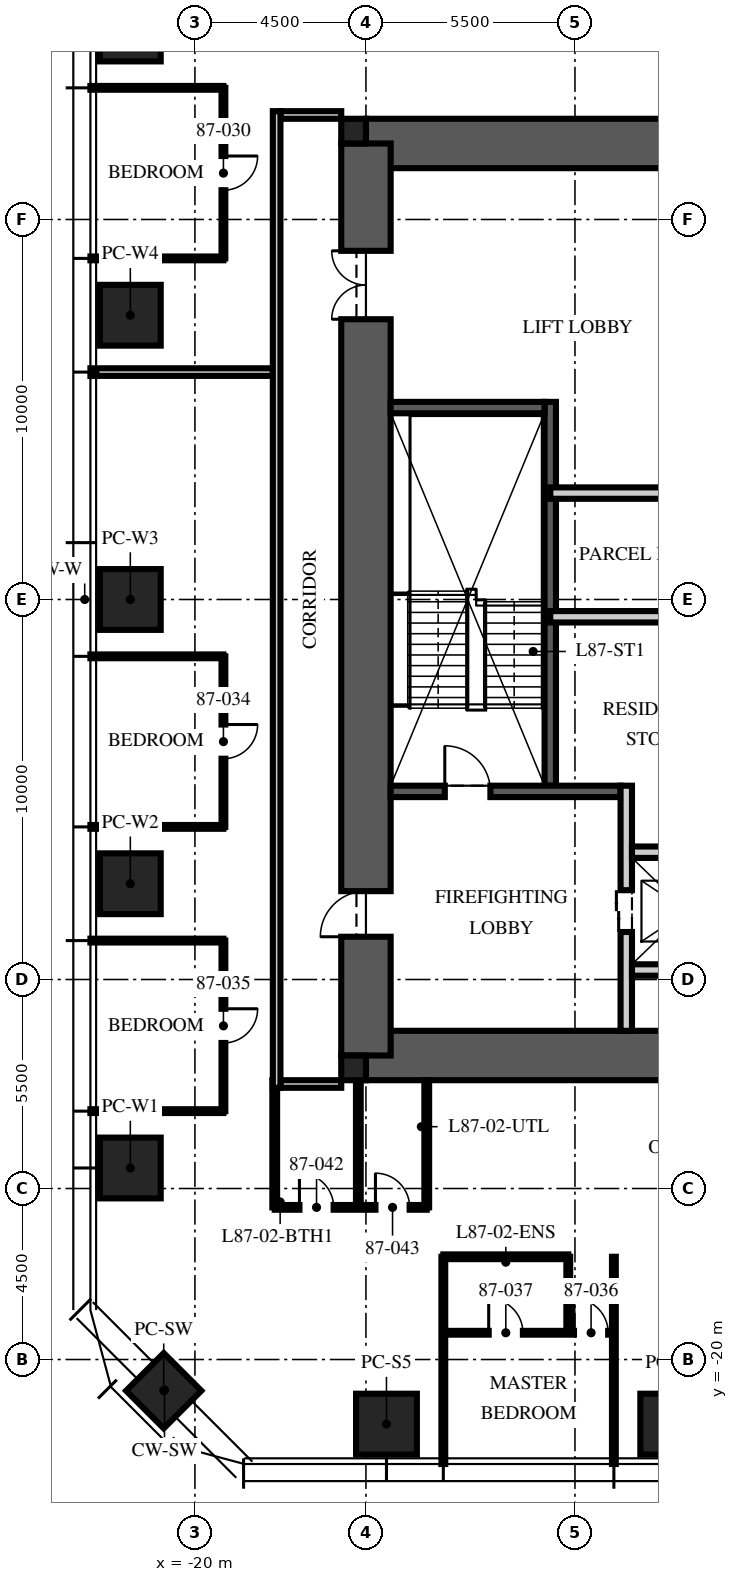
"""IFC4 building model, lengths in metres.
Left out: names, types, materials, properties, quantities, classifications, styles, units other than length and angle.
Written with IfcOpenShell. Run it as: python <this file> out.ifc"""

import sys

from ifc_helpers import new_model, si_unit, direction, frame, frame_2d, origin, origin_2d, place, context, subcontext, project, spatial, rectangle, extrude, element, fill, save


model = new_model("IFC4")
c1 = context("Model", 3, precision=1e-05, world=origin(), true_north=direction((0.0, 1.0)))
c2 = subcontext(c1, "Body", "Model", "MODEL_VIEW")
j1 = project(units=[si_unit("LENGTHUNIT", "METRE"), si_unit("PLANEANGLEUNIT", "RADIAN")], contexts=[c1])
p1 = place(None, origin())
s1 = spatial("IfcSite", under=j1, at=p1, CompositionType="ELEMENT")
p2 = place(p1, origin())
s2 = spatial("IfcBuilding", under=s1, at=p2, CompositionType="ELEMENT")
p3 = place(p2, frame((0.0, 0.0, 345.75)))
s3 = spatial("IfcBuildingStorey", under=s2, at=p3, CompositionType="ELEMENT", Elevation=345.75)
for number, where, z_axis, x_axis in (
    (1, (-15.5, 12.0, -0.25), (0.0, 0.0, 1.0), (1.0, 0.0, 0.0)),
    (2, (-15.5, -12.0, -0.25), (0.0, 0.0, 1.0), (1.0, 0.0, 0.0)),
):
    element("IfcWall", number, at=place(p3, frame(where, z_axis=z_axis, x_axis=x_axis)), inside=s3, PredefinedType="SHEAR", context=c2, shape_type="SweptSolid", body=[
        extrude(rectangle(XDim=31.0, YDim=1.3, at=frame_2d((15.5, 0.0))), origin(), (0.0, 0.0, 1.0), 3.75),
    ])
p4 = place(p3, frame((-15.5, -12.0, -0.25), z_axis=(0.0, 0.0, 1.0), x_axis=(0.0, 1.0, 0.0)))
e3 = element("IfcWall", 3, at=p4, inside=s3, PredefinedType="SHEAR", context=c2, shape_type="SweptSolid", body=[
    extrude(rectangle(XDim=24.0, YDim=1.3, at=frame_2d((12.0, 0.0))), origin(), (0.0, 0.0, 1.0), 3.75),
])
p5 = place(p4, frame((3.125, 0.0, 0.25)))
e4 = element("IfcOpeningElement", 4, at=p5, cuts=e3, PredefinedType="OPENING", context=c2, shape_type="SweptSolid", body=[
    extrude(rectangle(XDim=1.2, YDim=2.1, at=frame_2d((0.6, 1.05))), frame((0.0, 0.66, 0.0), z_axis=(0.0, -1.0, 0.0), x_axis=(1.0, 0.0, 0.0)), (0.0, 0.0, 1.0), 1.32),
])
p6 = place(p4, frame((19.375, 0.0, 0.25)))
e5 = element("IfcOpeningElement", 5, at=p6, cuts=e3, PredefinedType="OPENING", context=c2, shape_type="SweptSolid", body=[
    extrude(rectangle(XDim=1.8, YDim=2.1, at=frame_2d((0.9, 1.05))), frame((0.0, 0.66, 0.0), z_axis=(0.0, -1.0, 0.0), x_axis=(1.0, 0.0, 0.0)), (0.0, 0.0, 1.0), 1.32),
])
for number, where, z_axis, x_axis in (
    (6, (-15.825, 12.325, -0.25), (0.0, 0.0, 1.0), (1.0, 0.0, 0.0)),
    (7, (-15.825, -12.325, -0.25), (0.0, 0.0, 1.0), (1.0, 0.0, 0.0)),
):
    element("IfcColumn", number, at=place(p3, frame(where, z_axis=z_axis, x_axis=x_axis)), inside=s3, PredefinedType="COLUMN", context=c2, shape_type="SweptSolid", body=[
        extrude(rectangle(XDim=0.65, YDim=0.65, at=origin_2d()), origin(), (0.0, 0.0, 1.0), 3.75),
    ])
for number, where, z_axis, x_axis in (
    (8, (-7.48, -21.7, 0.0), (0.0, 0.0, 1.0), (1.0, 0.0, 0.0)),
    (9, (-14.96, -21.7, 0.0), (0.0, 0.0, 1.0), (1.0, 0.0, 0.0)),
    (10, (-21.7, -14.96, 0.0), (0.0, 0.0, 1.0), (0.0, 1.0, 0.0)),
    (11, (-21.7, -7.48, 0.0), (0.0, 0.0, 1.0), (0.0, 1.0, 0.0)),
    (12, (-21.7, 0.0, 0.0), (0.0, 0.0, 1.0), (0.0, 1.0, 0.0)),
    (13, (-21.7, 7.48, 0.0), (0.0, 0.0, 1.0), (0.0, 1.0, 0.0)),
    (14, (-21.7, 14.96, 0.0), (0.0, 0.0, 1.0), (0.0, 1.0, 0.0)),
):
    element("IfcColumn", number, at=place(p3, frame(where, z_axis=z_axis, x_axis=x_axis)), inside=s3, PredefinedType="COLUMN", context=c2, shape_type="SweptSolid", body=[
        extrude(rectangle(XDim=1.6, YDim=1.6, at=origin_2d()), origin(), (0.0, 0.0, 1.0), 3.75),
    ])
p7 = place(p3, frame((-20.821, -20.821, 0.0), z_axis=(0.0, 0.0, 1.0), x_axis=(0.707106781187, -0.707106781187, 0.0)))
e15 = element("IfcColumn", 15, at=p7, inside=s3, PredefinedType="COLUMN", context=c2, shape_type="SweptSolid", body=[
    extrude(rectangle(XDim=1.4, YDim=1.4, at=origin_2d()), origin(), (0.0, 0.0, 1.0), 3.75),
])
p8 = place(p3, frame((-10.65, -4.9, 0.0), z_axis=(0.0, 0.0, 1.0), x_axis=(0.0, 1.0, 0.0)))
e16 = element("IfcWall", 16, at=p8, inside=s3, PredefinedType="SOLIDWALL", context=c2, shape_type="SweptSolid", body=[
    extrude(rectangle(XDim=10.1, YDim=0.3, at=frame_2d((5.05, 0.0))), origin(), (0.0, 0.0, 1.0), 3.5),
])
p9 = place(p3, frame((-14.85, -5.05, 0.0), z_axis=(0.0, 0.0, 1.0), x_axis=(1.0, 0.0, 0.0)))
e17 = element("IfcWall", 17, at=p9, inside=s3, PredefinedType="SOLIDWALL", context=c2, shape_type="SweptSolid", body=[
    extrude(rectangle(XDim=6.05, YDim=0.3, at=frame_2d((3.025, 0.0))), origin(), (0.0, 0.0, 1.0), 3.5),
])
p10 = place(p9, frame((1.425, 0.0, 0.0)))
e18 = element("IfcOpeningElement", 18, at=p10, cuts=e17, PredefinedType="OPENING", context=c2, shape_type="SweptSolid", body=[
    extrude(rectangle(XDim=1.2, YDim=2.1, at=frame_2d((0.6, 1.05))), frame((0.0, 0.16, 0.0), z_axis=(0.0, -1.0, 0.0), x_axis=(1.0, 0.0, 0.0)), (0.0, 0.0, 1.0), 0.32),
])
p11 = place(p3, frame((-14.85, 5.05, 0.0), z_axis=(0.0, 0.0, 1.0), x_axis=(1.0, 0.0, 0.0)))
e19 = element("IfcWall", 19, at=p11, inside=s3, PredefinedType="SOLIDWALL", context=c2, shape_type="SweptSolid", body=[
    extrude(rectangle(XDim=4.05, YDim=0.3, at=frame_2d((2.025, 0.0))), origin(), (0.0, 0.0, 1.0), 3.5),
])
p12 = place(p3, frame((-8.65, -11.35, 0.0), z_axis=(0.0, 0.0, 1.0), x_axis=(0.0, 1.0, 0.0)))
e20 = element("IfcWall", 20, at=p12, inside=s3, PredefinedType="PARTITIONING", context=c2, shape_type="SweptSolid", body=[
    extrude(rectangle(XDim=6.45, YDim=0.3, at=frame_2d((3.225, 0.0))), origin(), (0.0, 0.0, 1.0), 3.5),
])
p13 = place(p12, frame((2.6, 0.0, 0.0)))
e21 = element("IfcOpeningElement", 21, at=p13, cuts=e20, PredefinedType="OPENING", context=c2, shape_type="SweptSolid", body=[
    extrude(rectangle(XDim=1.1, YDim=2.1, at=frame_2d((0.55, 1.05))), frame((0.0, 0.16, 0.0), z_axis=(0.0, -1.0, 0.0), x_axis=(1.0, 0.0, 0.0)), (0.0, 0.0, 1.0), 0.32),
])
p14 = place(p3, frame((-8.5, -6.65, 0.0), z_axis=(0.0, 0.0, 1.0), x_axis=(1.0, 0.0, 0.0)))
e22 = element("IfcWall", 22, at=p14, inside=s3, PredefinedType="PARTITIONING", context=c2, shape_type="SweptSolid", body=[
    extrude(rectangle(XDim=17.0, YDim=0.3, at=frame_2d((8.5, 0.0))), origin(), (0.0, 0.0, 1.0), 3.5),
])
p15 = place(p14, frame((7.8, 0.0, 0.0)))
e23 = element("IfcOpeningElement", 23, at=p15, cuts=e22, PredefinedType="OPENING", context=c2, shape_type="SweptSolid", body=[
    extrude(rectangle(XDim=1.3, YDim=2.4, at=frame_2d((0.65, 1.2))), frame((0.0, 0.16, 0.0), z_axis=(0.0, -1.0, 0.0), x_axis=(1.0, 0.0, 0.0)), (0.0, 0.0, 1.0), 0.32),
])
p16 = place(p14, frame((5.65, 0.0, 0.0)))
e24 = element("IfcOpeningElement", 24, at=p16, cuts=e22, PredefinedType="OPENING", context=c2, shape_type="SweptSolid", body=[
    extrude(rectangle(XDim=0.9, YDim=2.1, at=frame_2d((0.45, 1.05))), frame((0.0, 0.16, 0.0), z_axis=(0.0, -1.0, 0.0), x_axis=(1.0, 0.0, 0.0)), (0.0, 0.0, 1.0), 0.32),
])
p17 = place(p14, frame((10.4, 0.0, 0.0)))
e25 = element("IfcOpeningElement", 25, at=p17, cuts=e22, PredefinedType="OPENING", context=c2, shape_type="SweptSolid", body=[
    extrude(rectangle(XDim=0.9, YDim=2.1, at=frame_2d((0.45, 1.05))), frame((0.0, 0.16, 0.0), z_axis=(0.0, -1.0, 0.0), x_axis=(1.0, 0.0, 0.0)), (0.0, 0.0, 1.0), 0.32),
])
p18 = place(p3, frame((-8.5, -9.75, 0.0), z_axis=(0.0, 0.0, 1.0), x_axis=(1.0, 0.0, 0.0)))
e26 = element("IfcWall", 26, at=p18, inside=s3, PredefinedType="PARTITIONING", context=c2, shape_type="SweptSolid", body=[
    extrude(rectangle(XDim=2.9, YDim=0.3, at=frame_2d((1.45, 0.0))), origin(), (0.0, 0.0, 1.0), 3.5),
])
p19 = place(p3, frame((-10.65, 2.8, 0.0), z_axis=(0.0, 0.0, 1.0), x_axis=(1.0, 0.0, 0.0)))
e27 = element("IfcWall", 27, at=p19, inside=s3, PredefinedType="PARTITIONING", context=c2, shape_type="SweptSolid", body=[
    extrude(rectangle(XDim=21.3, YDim=0.3, at=frame_2d((10.65, 0.0))), origin(), (0.0, 0.0, 1.0), 3.5),
])
p20 = place(p19, frame((10.05, 0.0, 0.0)))
e28 = element("IfcOpeningElement", 28, at=p20, cuts=e27, PredefinedType="OPENING", context=c2, shape_type="SweptSolid", body=[
    extrude(rectangle(XDim=1.2, YDim=2.1, at=frame_2d((0.6, 1.05))), frame((0.0, 0.16, 0.0), z_axis=(0.0, -1.0, 0.0), x_axis=(1.0, 0.0, 0.0)), (0.0, 0.0, 1.0), 0.32),
])
p21 = place(p19, frame((19.121, 0.0, 0.0)))
e29 = element("IfcOpeningElement", 29, at=p21, cuts=e27, PredefinedType="OPENING", context=c2, shape_type="SweptSolid", body=[
    extrude(rectangle(XDim=0.9, YDim=2.1, at=frame_2d((0.45, 1.05))), frame((0.0, 0.16, 0.0), z_axis=(0.0, -1.0, 0.0), x_axis=(1.0, 0.0, 0.0)), (0.0, 0.0, 1.0), 0.32),
])
p22 = place(p3, frame((-10.65, -0.455, 0.0), z_axis=(0.0, 0.0, 1.0), x_axis=(1.0, 0.0, 0.0)))
e30 = element("IfcWall", 30, at=p22, inside=s3, PredefinedType="PARTITIONING", context=c2, shape_type="SweptSolid", body=[
    extrude(rectangle(XDim=5.55, YDim=0.3, at=frame_2d((2.775, 0.0))), origin(), (0.0, 0.0, 1.0), 3.5),
])
for number, where, z_axis, x_axis in (
    (31, (-16.15, 12.75, 0.0), (0.0, 0.0, 1.0), (-1.0, 0.0, 0.0)),
    (32, (-16.15, -12.75, 0.0), (0.0, 0.0, 1.0), (-1.0, 0.0, 0.0)),
):
    element("IfcWall", number, at=place(p3, frame(where, z_axis=z_axis, x_axis=x_axis)), inside=s3, PredefinedType="PARTITIONING", context=c2, shape_type="SweptSolid", body=[
        extrude(rectangle(XDim=1.6, YDim=0.2, at=frame_2d((0.8, 0.0))), origin(), (0.0, 0.0, 1.0), 2.5),
    ])
for number, where, z_axis, x_axis in (
    (33, (-19.25, 13.464, 0.0), (0.0, 0.0, 1.0), (-1.0, 0.0, 0.0)),
    (34, (-19.25, 8.976, 0.0), (0.0, 0.0, 1.0), (-1.0, 0.0, 0.0)),
):
    element("IfcWall", number, at=place(p3, frame(where, z_axis=z_axis, x_axis=x_axis)), inside=s3, PredefinedType="PARTITIONING", context=c2, shape_type="SweptSolid", body=[
        extrude(rectangle(XDim=3.5, YDim=0.1, at=frame_2d((1.75, 0.0))), origin(), (0.0, 0.0, 1.0), 2.91),
    ])
p23 = place(p3, frame((-17.95, 5.984, 0.0), z_axis=(0.0, 0.0, 1.0), x_axis=(-1.0, 0.0, 0.0)))
e35 = element("IfcWall", 35, at=p23, inside=s3, PredefinedType="PARTITIONING", context=c2, shape_type="SweptSolid", body=[
    extrude(rectangle(XDim=4.8, YDim=0.2, at=frame_2d((2.4, 0.0))), origin(), (0.0, 0.0, 1.0), 2.91),
])
for number, where, z_axis, x_axis in (
    (36, (-19.25, -1.496, 0.0), (0.0, 0.0, 1.0), (-1.0, 0.0, 0.0)),
    (37, (-19.25, -5.984, 0.0), (0.0, 0.0, 1.0), (-1.0, 0.0, 0.0)),
    (38, (-19.25, -8.976, 0.0), (0.0, 0.0, 1.0), (-1.0, 0.0, 0.0)),
    (39, (-19.25, -13.464, 0.0), (0.0, 0.0, 1.0), (-1.0, 0.0, 0.0)),
):
    element("IfcWall", number, at=place(p3, frame(where, z_axis=z_axis, x_axis=x_axis)), inside=s3, PredefinedType="PARTITIONING", context=c2, shape_type="SweptSolid", body=[
        extrude(rectangle(XDim=3.5, YDim=0.1, at=frame_2d((1.75, 0.0))), origin(), (0.0, 0.0, 1.0), 2.91),
    ])
for number, where, z_axis, x_axis in (
    (40, (-13.464, -17.296, 0.0), (0.0, 0.0, 1.0), (0.0, -1.0, 0.0)),
    (41, (-8.976, -17.296, 0.0), (0.0, 0.0, 1.0), (0.0, -1.0, 0.0)),
):
    element("IfcWall", number, at=place(p3, frame(where, z_axis=z_axis, x_axis=x_axis)), inside=s3, PredefinedType="PARTITIONING", context=c2, shape_type="SweptSolid", body=[
        extrude(rectangle(XDim=5.454, YDim=0.1, at=frame_2d((2.727, 0.0))), origin(), (0.0, 0.0, 1.0), 2.91),
    ])
p24 = place(p3, frame((-19.25, 13.464, 0.0), z_axis=(0.0, 0.0, 1.0), x_axis=(0.0, -1.0, 0.0)))
e42 = element("IfcWall", 42, at=p24, inside=s3, PredefinedType="PARTITIONING", context=c2, shape_type="SweptSolid", body=[
    extrude(rectangle(XDim=4.488, YDim=0.1, at=frame_2d((2.244, 0.0))), origin(), (0.0, 0.0, 1.0), 2.81),
])
p25 = place(p24, frame((1.794, 0.0, 0.0)))
e43 = element("IfcOpeningElement", 43, at=p25, cuts=e42, PredefinedType="OPENING", context=c2, shape_type="SweptSolid", body=[
    extrude(rectangle(XDim=0.9, YDim=2.1, at=frame_2d((0.45, 1.05))), frame((0.0, 0.06, 0.0), z_axis=(0.0, -1.0, 0.0), x_axis=(1.0, 0.0, 0.0)), (0.0, 0.0, 1.0), 0.12),
])
p26 = place(p3, frame((-19.25, -1.496, 0.0), z_axis=(0.0, 0.0, 1.0), x_axis=(0.0, -1.0, 0.0)))
e44 = element("IfcWall", 44, at=p26, inside=s3, PredefinedType="PARTITIONING", context=c2, shape_type="SweptSolid", body=[
    extrude(rectangle(XDim=4.488, YDim=0.1, at=frame_2d((2.244, 0.0))), origin(), (0.0, 0.0, 1.0), 2.81),
])
p27 = place(p26, frame((1.794, 0.0, 0.0)))
e45 = element("IfcOpeningElement", 45, at=p27, cuts=e44, PredefinedType="OPENING", context=c2, shape_type="SweptSolid", body=[
    extrude(rectangle(XDim=0.9, YDim=2.1, at=frame_2d((0.45, 1.05))), frame((0.0, 0.06, 0.0), z_axis=(0.0, -1.0, 0.0), x_axis=(1.0, 0.0, 0.0)), (0.0, 0.0, 1.0), 0.12),
])
p28 = place(p3, frame((-19.25, -8.976, 0.0), z_axis=(0.0, 0.0, 1.0), x_axis=(0.0, -1.0, 0.0)))
e46 = element("IfcWall", 46, at=p28, inside=s3, PredefinedType="PARTITIONING", context=c2, shape_type="SweptSolid", body=[
    extrude(rectangle(XDim=4.488, YDim=0.1, at=frame_2d((2.244, 0.0))), origin(), (0.0, 0.0, 1.0), 2.81),
])
p29 = place(p28, frame((1.794, 0.0, 0.0)))
e47 = element("IfcOpeningElement", 47, at=p29, cuts=e46, PredefinedType="OPENING", context=c2, shape_type="SweptSolid", body=[
    extrude(rectangle(XDim=0.9, YDim=2.1, at=frame_2d((0.45, 1.05))), frame((0.0, 0.06, 0.0), z_axis=(0.0, -1.0, 0.0), x_axis=(1.0, 0.0, 0.0)), (0.0, 0.0, 1.0), 0.12),
])
p30 = place(p3, frame((-13.464, -19.296, 0.0), z_axis=(0.0, 0.0, 1.0), x_axis=(1.0, 0.0, 0.0)))
e48 = element("IfcWall", 48, at=p30, inside=s3, PredefinedType="PARTITIONING", context=c2, shape_type="SweptSolid", body=[
    extrude(rectangle(XDim=4.488, YDim=0.1, at=frame_2d((2.244, 0.0))), origin(), (0.0, 0.0, 1.0), 2.81),
])
p31 = place(p30, frame((3.438, 0.0, 0.0)))
e49 = element("IfcOpeningElement", 49, at=p31, cuts=e48, PredefinedType="OPENING", context=c2, shape_type="SweptSolid", body=[
    extrude(rectangle(XDim=0.9, YDim=2.1, at=frame_2d((0.45, 1.05))), frame((0.0, 0.06, 0.0), z_axis=(0.0, -1.0, 0.0), x_axis=(1.0, 0.0, 0.0)), (0.0, 0.0, 1.0), 0.12),
])
p32 = place(p30, frame((1.194, 0.0, 0.0)))
e50 = element("IfcOpeningElement", 50, at=p32, cuts=e48, PredefinedType="OPENING", context=c2, shape_type="SweptSolid", body=[
    extrude(rectangle(XDim=0.9, YDim=2.1, at=frame_2d((0.45, 1.05))), frame((0.0, 0.06, 0.0), z_axis=(0.0, -1.0, 0.0), x_axis=(1.0, 0.0, 0.0)), (0.0, 0.0, 1.0), 0.12),
])
p33 = place(p3, frame((-10.176, -17.296, 0.0), z_axis=(0.0, 0.0, 1.0), x_axis=(0.0, -1.0, 0.0)))
e51 = element("IfcWall", 51, at=p33, inside=s3, PredefinedType="PARTITIONING", context=c2, shape_type="SweptSolid", body=[
    extrude(rectangle(XDim=2.0, YDim=0.1, at=frame_2d((1.0, 0.0))), origin(), (0.0, 0.0, 1.0), 3.5),
])
p34 = place(p3, frame((-13.464, -17.296, 0.0), z_axis=(0.0, 0.0, 1.0), x_axis=(1.0, 0.0, 0.0)))
e52 = element("IfcWall", 52, at=p34, inside=s3, PredefinedType="PARTITIONING", context=c2, shape_type="SweptSolid", body=[
    extrude(rectangle(XDim=3.288, YDim=0.125, at=frame_2d((1.644, 0.0))), origin(), (0.0, 0.0, 1.0), 2.81),
])
p35 = place(p3, frame((-17.9, -15.996, 0.0), z_axis=(0.0, 0.0, 1.0), x_axis=(1.0, 0.0, 0.0)))
e53 = element("IfcWall", 53, at=p35, inside=s3, PredefinedType="PARTITIONING", context=c2, shape_type="SweptSolid", body=[
    extrude(rectangle(XDim=4.0, YDim=0.125, at=frame_2d((2.0, 0.0))), origin(), (0.0, 0.0, 1.0), 2.5),
])
p36 = place(p35, frame((0.65, 0.0, 0.0)))
e54 = element("IfcOpeningElement", 54, at=p36, cuts=e53, PredefinedType="OPENING", context=c2, shape_type="SweptSolid", body=[
    extrude(rectangle(XDim=0.9, YDim=2.1, at=frame_2d((0.45, 1.05))), frame((0.0, 0.073, 0.0), z_axis=(0.0, -1.0, 0.0), x_axis=(1.0, 0.0, 0.0)), (0.0, 0.0, 1.0), 0.145),
])
p37 = place(p35, frame((2.65, 0.0, 0.0)))
e55 = element("IfcOpeningElement", 55, at=p37, cuts=e53, PredefinedType="OPENING", context=c2, shape_type="SweptSolid", body=[
    extrude(rectangle(XDim=0.9, YDim=2.1, at=frame_2d((0.45, 1.05))), frame((0.0, 0.073, 0.0), z_axis=(0.0, -1.0, 0.0), x_axis=(1.0, 0.0, 0.0)), (0.0, 0.0, 1.0), 0.145),
])
for number, where, z_axis, x_axis in (
    (56, (-17.9, -12.65, 0.0), (0.0, 0.0, 1.0), (0.0, -1.0, 0.0)),
    (57, (-15.7, -12.65, 0.0), (0.0, 0.0, 1.0), (0.0, -1.0, 0.0)),
):
    element("IfcWall", number, at=place(p3, frame(where, z_axis=z_axis, x_axis=x_axis)), inside=s3, PredefinedType="PARTITIONING", context=c2, shape_type="SweptSolid", body=[
        extrude(rectangle(XDim=3.346, YDim=0.125, at=frame_2d((1.673, 0.0))), origin(), (0.0, 0.0, 1.0), 2.5),
    ])
p38 = place(p3, frame((-13.9, -12.65, 0.0), z_axis=(0.0, 0.0, 1.0), x_axis=(0.0, -1.0, 0.0)))
e58 = element("IfcWall", 58, at=p38, inside=s3, PredefinedType="PARTITIONING", context=c2, shape_type="SweptSolid", body=[
    extrude(rectangle(XDim=3.346, YDim=0.125, at=frame_2d((1.673, 0.0))), origin(), (0.0, 0.0, 1.0), 3.5),
])
p39 = place(p3, frame((-17.85, 12.85, 0.0), z_axis=(0.0, 0.0, 1.0), x_axis=(0.0, -1.0, 0.0)))
e59 = element("IfcWall", 59, at=p39, inside=s3, PredefinedType="PARTITIONING", context=c2, shape_type="SweptSolid", body=[
    extrude(rectangle(XDim=25.7, YDim=0.2, at=frame_2d((12.85, 0.0))), origin(), (0.0, 0.0, 1.0), 2.81),
])
p40 = place(p10, origin())
e60 = element("IfcDoor", 60, at=p40, inside=s3, OperationType="SINGLE_SWING_LEFT", PredefinedType="DOOR", context=c2, shape_type="SweptSolid", body=[
    extrude(rectangle(XDim=1.2, YDim=2.1, at=frame_2d((0.6, 1.05))), frame((0.0, 0.025, 0.0), z_axis=(0.0, -1.0, 0.0), x_axis=(1.0, 0.0, 0.0)), (0.0, 0.0, 1.0), 0.05),
])
fill(e18, e60)
p41 = place(p5, origin())
e61 = element("IfcDoor", 61, at=p41, inside=s3, OperationType="SINGLE_SWING_LEFT", PredefinedType="DOOR", context=c2, shape_type="SweptSolid", body=[
    extrude(rectangle(XDim=1.2, YDim=2.1, at=frame_2d((0.6, 1.05))), frame((0.0, 0.025, 0.0), z_axis=(0.0, -1.0, 0.0), x_axis=(1.0, 0.0, 0.0)), (0.0, 0.0, 1.0), 0.05),
])
fill(e4, e61)
p42 = place(p6, origin())
e62 = element("IfcDoor", 62, at=p42, inside=s3, OperationType="DOUBLE_DOOR_SINGLE_SWING", PredefinedType="DOOR", context=c2, shape_type="SweptSolid", body=[
    extrude(rectangle(XDim=1.8, YDim=2.1, at=frame_2d((0.9, 1.05))), frame((0.0, 0.025, 0.0), z_axis=(0.0, -1.0, 0.0), x_axis=(1.0, 0.0, 0.0)), (0.0, 0.0, 1.0), 0.05),
])
fill(e5, e62)
p43 = place(p13, origin())
e63 = element("IfcDoor", 63, at=p43, inside=s3, OperationType="DOUBLE_DOOR_SLIDING", PredefinedType="DOOR", context=c2, shape_type="SweptSolid", body=[
    extrude(rectangle(XDim=1.1, YDim=2.1, at=frame_2d((0.55, 1.05))), frame((0.0, 0.025, 0.0), z_axis=(0.0, -1.0, 0.0), x_axis=(1.0, 0.0, 0.0)), (0.0, 0.0, 1.0), 0.05),
])
fill(e21, e63)
p44 = place(p25, origin())
e64 = element("IfcDoor", 64, at=p44, inside=s3, OperationType="SINGLE_SWING_LEFT", PredefinedType="DOOR", context=c2, shape_type="SweptSolid", body=[
    extrude(rectangle(XDim=0.9, YDim=2.1, at=frame_2d((0.45, 1.05))), frame((0.0, 0.025, 0.0), z_axis=(0.0, -1.0, 0.0), x_axis=(1.0, 0.0, 0.0)), (0.0, 0.0, 1.0), 0.05),
])
fill(e43, e64)
p45 = place(p27, origin())
e65 = element("IfcDoor", 65, at=p45, inside=s3, OperationType="SINGLE_SWING_LEFT", PredefinedType="DOOR", context=c2, shape_type="SweptSolid", body=[
    extrude(rectangle(XDim=0.9, YDim=2.1, at=frame_2d((0.45, 1.05))), frame((0.0, 0.025, 0.0), z_axis=(0.0, -1.0, 0.0), x_axis=(1.0, 0.0, 0.0)), (0.0, 0.0, 1.0), 0.05),
])
fill(e45, e65)
p46 = place(p29, origin())
e66 = element("IfcDoor", 66, at=p46, inside=s3, OperationType="SINGLE_SWING_LEFT", PredefinedType="DOOR", context=c2, shape_type="SweptSolid", body=[
    extrude(rectangle(XDim=0.9, YDim=2.1, at=frame_2d((0.45, 1.05))), frame((0.0, 0.025, 0.0), z_axis=(0.0, -1.0, 0.0), x_axis=(1.0, 0.0, 0.0)), (0.0, 0.0, 1.0), 0.05),
])
fill(e47, e66)
p47 = place(p31, origin())
e67 = element("IfcDoor", 67, at=p47, inside=s3, OperationType="SINGLE_SWING_LEFT", PredefinedType="DOOR", context=c2, shape_type="SweptSolid", body=[
    extrude(rectangle(XDim=0.9, YDim=2.1, at=frame_2d((0.45, 1.05))), frame((0.0, 0.025, 0.0), z_axis=(0.0, -1.0, 0.0), x_axis=(1.0, 0.0, 0.0)), (0.0, 0.0, 1.0), 0.05),
])
fill(e49, e67)
p48 = place(p32, origin())
e68 = element("IfcDoor", 68, at=p48, inside=s3, OperationType="SINGLE_SWING_LEFT", PredefinedType="DOOR", context=c2, shape_type="SweptSolid", body=[
    extrude(rectangle(XDim=0.9, YDim=2.1, at=frame_2d((0.45, 1.05))), frame((0.0, 0.025, 0.0), z_axis=(0.0, -1.0, 0.0), x_axis=(1.0, 0.0, 0.0)), (0.0, 0.0, 1.0), 0.05),
])
fill(e50, e68)
p49 = place(p36, origin())
e69 = element("IfcDoor", 69, at=p49, inside=s3, OperationType="SINGLE_SWING_LEFT", PredefinedType="DOOR", context=c2, shape_type="SweptSolid", body=[
    extrude(rectangle(XDim=0.9, YDim=2.1, at=frame_2d((0.45, 1.05))), frame((0.0, 0.025, 0.0), z_axis=(0.0, -1.0, 0.0), x_axis=(1.0, 0.0, 0.0)), (0.0, 0.0, 1.0), 0.05),
])
fill(e54, e69)
p50 = place(p37, origin())
e70 = element("IfcDoor", 70, at=p50, inside=s3, OperationType="SINGLE_SWING_LEFT", PredefinedType="DOOR", context=c2, shape_type="SweptSolid", body=[
    extrude(rectangle(XDim=0.9, YDim=2.1, at=frame_2d((0.45, 1.05))), frame((0.0, 0.025, 0.0), z_axis=(0.0, -1.0, 0.0), x_axis=(1.0, 0.0, 0.0)), (0.0, 0.0, 1.0), 0.05),
])
fill(e55, e70)
save(model, sys.argv[1])
